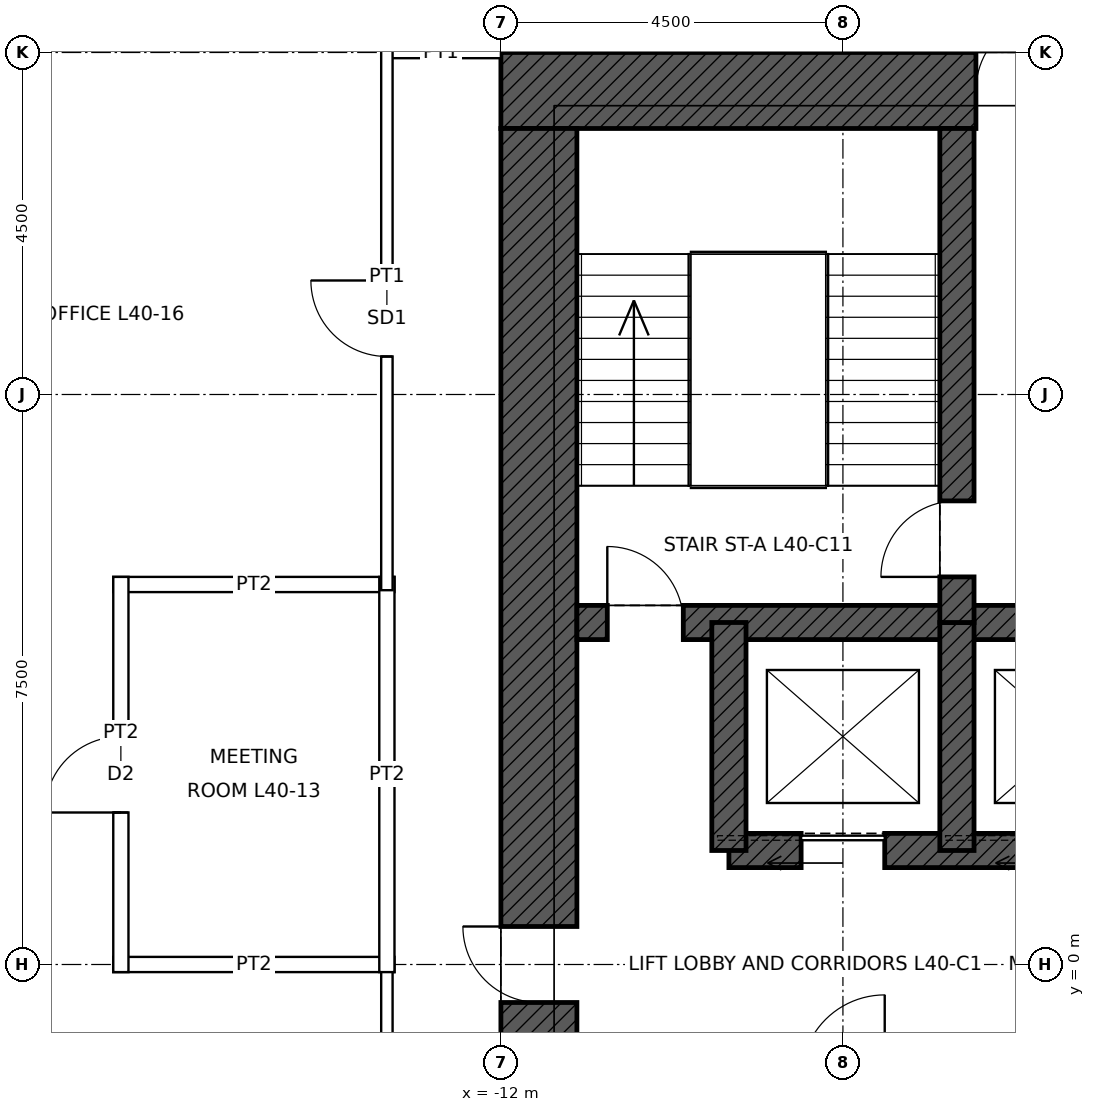
"""IFC4 building model, lengths in metres.
Left out: names, types, materials, properties, quantities, classifications, styles, units other than length and angle.
Written with IfcOpenShell. Run it as: python <this file> out.ifc"""

import sys

from ifc_helpers import new_model, si_unit, direction, frame, frame_2d, origin, place, context, subcontext, project, spatial, rectangle, extrude, element, fill, save


model = new_model("IFC4")
c1 = context("Model", 3, precision=1e-05, world=origin(), true_north=direction((0.0, 1.0)))
c2 = subcontext(c1, "Body", "Model", "MODEL_VIEW")
j1 = project(units=[si_unit("LENGTHUNIT", "METRE"), si_unit("PLANEANGLEUNIT", "RADIAN")], contexts=[c1])
p1 = place(None, origin())
s1 = spatial("IfcSite", under=j1, at=p1, CompositionType="ELEMENT")
p2 = place(p1, origin())
s2 = spatial("IfcBuilding", under=s1, at=p2, CompositionType="ELEMENT")
p3 = place(p2, frame((0.0, 0.0, 193.9)))
s3 = spatial("IfcBuildingStorey", under=s2, at=p3, CompositionType="ELEMENT", Elevation=193.9)
p4 = place(p3, frame((-12.0, 11.5, 0.0), z_axis=(0.0, 0.0, 1.0), x_axis=(1.0, 0.0, 0.0)))
e1 = element("IfcWall", 1, at=p4, inside=s3, PredefinedType="SHEAR", context=c2, shape_type="SweptSolid", body=[
    extrude(rectangle(XDim=24.0, YDim=1.0, at=frame_2d((12.0, 0.0))), origin(), (0.0, 0.0, 1.0), 4.0),
])
p5 = place(p4, frame((6.25, 0.0, 0.0)))
e2 = element("IfcOpeningElement", 2, at=p5, cuts=e1, PredefinedType="OPENING", context=c2, shape_type="SweptSolid", body=[
    extrude(rectangle(XDim=1.0, YDim=2.4, at=frame_2d((0.5, 1.2))), frame((0.0, 0.51, 0.0), z_axis=(0.0, -1.0, 0.0), x_axis=(1.0, 0.0, 0.0)), (0.0, 0.0, 1.0), 1.02),
])
p6 = place(p4, frame((16.75, 0.0, 0.0)))
e3 = element("IfcOpeningElement", 3, at=p6, cuts=e1, PredefinedType="OPENING", context=c2, shape_type="SweptSolid", body=[
    extrude(rectangle(XDim=1.0, YDim=2.4, at=frame_2d((0.5, 1.2))), frame((0.0, 0.51, 0.0), z_axis=(0.0, -1.0, 0.0), x_axis=(1.0, 0.0, 0.0)), (0.0, 0.0, 1.0), 1.02),
])
p7 = place(p3, frame((-11.5, -11.0, 0.0), z_axis=(0.0, 0.0, 1.0), x_axis=(0.0, 1.0, 0.0)))
e4 = element("IfcWall", 4, at=p7, inside=s3, PredefinedType="SHEAR", context=c2, shape_type="SweptSolid", body=[
    extrude(rectangle(XDim=22.0, YDim=1.0, at=frame_2d((11.0, 0.0))), origin(), (0.0, 0.0, 1.0), 4.0),
])
p8 = place(p7, frame((10.5, 0.0, 0.0)))
e5 = element("IfcOpeningElement", 5, at=p8, cuts=e4, PredefinedType="OPENING", context=c2, shape_type="SweptSolid", body=[
    extrude(rectangle(XDim=1.0, YDim=2.4, at=frame_2d((0.5, 1.2))), frame((0.0, 0.51, 0.0), z_axis=(0.0, -1.0, 0.0), x_axis=(1.0, 0.0, 0.0)), (0.0, 0.0, 1.0), 1.02),
])
p9 = place(p3, frame((-11.0, 4.5, 0.0), z_axis=(0.0, 0.0, 1.0), x_axis=(1.0, 0.0, 0.0)))
e6 = element("IfcWall", 6, at=p9, inside=s3, PredefinedType="SHEAR", context=c2, shape_type="SweptSolid", body=[
    extrude(rectangle(XDim=22.0, YDim=0.45, at=frame_2d((11.0, 0.0))), origin(), (0.0, 0.0, 1.0), 4.0),
])
p10 = place(p9, frame((0.4, 0.0, 0.0)))
e7 = element("IfcOpeningElement", 7, at=p10, cuts=e6, PredefinedType="OPENING", context=c2, shape_type="SweptSolid", body=[
    extrude(rectangle(XDim=1.0, YDim=2.1, at=frame_2d((0.5, 1.05))), frame((0.0, 0.235, 0.0), z_axis=(0.0, -1.0, 0.0), x_axis=(1.0, 0.0, 0.0)), (0.0, 0.0, 1.0), 0.47),
])
p11 = place(p9, frame((20.6, 0.0, 0.0)))
e8 = element("IfcOpeningElement", 8, at=p11, cuts=e6, PredefinedType="OPENING", context=c2, shape_type="SweptSolid", body=[
    extrude(rectangle(XDim=1.0, YDim=2.1, at=frame_2d((0.5, 1.05))), frame((0.0, 0.235, 0.0), z_axis=(0.0, -1.0, 0.0), x_axis=(1.0, 0.0, 0.0)), (0.0, 0.0, 1.0), 0.47),
])
p12 = place(p3, frame((-9.0, 1.5, 0.0), z_axis=(0.0, 0.0, 1.0), x_axis=(1.0, 0.0, 0.0)))
e9 = element("IfcWall", 9, at=p12, inside=s3, PredefinedType="SHEAR", context=c2, shape_type="SweptSolid", body=[
    extrude(rectangle(XDim=18.0, YDim=0.45, at=frame_2d((9.0, 0.0))), origin(), (0.0, 0.0, 1.0), 4.0),
])
p13 = place(p12, frame((0.95, 0.0, 0.0)))
e10 = element("IfcOpeningElement", 10, at=p13, cuts=e9, PredefinedType="OPENING", context=c2, shape_type="SweptSolid", body=[
    extrude(rectangle(XDim=1.1, YDim=2.1, at=frame_2d((0.55, 1.05))), frame((0.0, 0.235, 0.0), z_axis=(0.0, -1.0, 0.0), x_axis=(1.0, 0.0, 0.0)), (0.0, 0.0, 1.0), 0.47),
])
p14 = place(p12, frame((3.95, 0.0, 0.0)))
e11 = element("IfcOpeningElement", 11, at=p14, cuts=e9, PredefinedType="OPENING", context=c2, shape_type="SweptSolid", body=[
    extrude(rectangle(XDim=1.1, YDim=2.1, at=frame_2d((0.55, 1.05))), frame((0.0, 0.235, 0.0), z_axis=(0.0, -1.0, 0.0), x_axis=(1.0, 0.0, 0.0)), (0.0, 0.0, 1.0), 0.47),
])
p15 = place(p12, frame((6.95, 0.0, 0.0)))
e12 = element("IfcOpeningElement", 12, at=p15, cuts=e9, PredefinedType="OPENING", context=c2, shape_type="SweptSolid", body=[
    extrude(rectangle(XDim=1.1, YDim=2.1, at=frame_2d((0.55, 1.05))), frame((0.0, 0.235, 0.0), z_axis=(0.0, -1.0, 0.0), x_axis=(1.0, 0.0, 0.0)), (0.0, 0.0, 1.0), 0.47),
])
p16 = place(p12, frame((9.95, 0.0, 0.0)))
e13 = element("IfcOpeningElement", 13, at=p16, cuts=e9, PredefinedType="OPENING", context=c2, shape_type="SweptSolid", body=[
    extrude(rectangle(XDim=1.1, YDim=2.1, at=frame_2d((0.55, 1.05))), frame((0.0, 0.235, 0.0), z_axis=(0.0, -1.0, 0.0), x_axis=(1.0, 0.0, 0.0)), (0.0, 0.0, 1.0), 0.47),
])
p17 = place(p12, frame((12.95, 0.0, 0.0)))
e14 = element("IfcOpeningElement", 14, at=p17, cuts=e9, PredefinedType="OPENING", context=c2, shape_type="SweptSolid", body=[
    extrude(rectangle(XDim=1.1, YDim=2.1, at=frame_2d((0.55, 1.05))), frame((0.0, 0.235, 0.0), z_axis=(0.0, -1.0, 0.0), x_axis=(1.0, 0.0, 0.0)), (0.0, 0.0, 1.0), 0.47),
])
p18 = place(p12, frame((15.95, 0.0, 0.0)))
e15 = element("IfcOpeningElement", 15, at=p18, cuts=e9, PredefinedType="OPENING", context=c2, shape_type="SweptSolid", body=[
    extrude(rectangle(XDim=1.1, YDim=2.1, at=frame_2d((0.55, 1.05))), frame((0.0, 0.235, 0.0), z_axis=(0.0, -1.0, 0.0), x_axis=(1.0, 0.0, 0.0)), (0.0, 0.0, 1.0), 0.47),
])
for number, where, z_axis, x_axis in (
    (16, (-9.0, 1.5, 0.0), (0.0, 0.0, 1.0), (0.0, 1.0, 0.0)),
    (17, (-6.0, 1.5, 0.0), (0.0, 0.0, 1.0), (0.0, 1.0, 0.0)),
):
    element("IfcWall", number, at=place(p3, frame(where, z_axis=z_axis, x_axis=x_axis)), inside=s3, PredefinedType="SHEAR", context=c2, shape_type="SweptSolid", body=[
        extrude(rectangle(XDim=3.0, YDim=0.45, at=frame_2d((1.5, 0.0))), origin(), (0.0, 0.0, 1.0), 4.0),
    ])
p19 = place(p3, frame((-6.0, 4.5, 0.0), z_axis=(0.0, 0.0, 1.0), x_axis=(0.0, 1.0, 0.0)))
e18 = element("IfcWall", 18, at=p19, inside=s3, PredefinedType="SHEAR", context=c2, shape_type="SweptSolid", body=[
    extrude(rectangle(XDim=6.5, YDim=0.45, at=frame_2d((3.25, 0.0))), origin(), (0.0, 0.0, 1.0), 4.0),
])
p20 = place(p19, frame((0.6, 0.0, 0.0)))
e19 = element("IfcOpeningElement", 19, at=p20, cuts=e18, PredefinedType="OPENING", context=c2, shape_type="SweptSolid", body=[
    extrude(rectangle(XDim=1.0, YDim=2.1, at=frame_2d((0.5, 1.05))), frame((0.0, 0.235, 0.0), z_axis=(0.0, -1.0, 0.0), x_axis=(1.0, 0.0, 0.0)), (0.0, 0.0, 1.0), 0.47),
])
p21 = place(p3, frame((-17.1, 0.0, 0.0), z_axis=(0.0, 0.0, 1.0), x_axis=(1.0, 0.0, 0.0)))
e20 = element("IfcWall", 20, at=p21, inside=s3, PredefinedType="PARTITIONING", context=c2, shape_type="SweptSolid", body=[
    extrude(rectangle(XDim=3.7, YDim=0.2, at=frame_2d((1.85, 0.0))), origin(), (0.0, 0.0, 1.0), 3.238),
])
p22 = place(p3, frame((-17.1, 5.0, 0.0), z_axis=(0.0, 0.0, 1.0), x_axis=(1.0, 0.0, 0.0)))
e21 = element("IfcWall", 21, at=p22, inside=s3, PredefinedType="PARTITIONING", context=c2, shape_type="SweptSolid", body=[
    extrude(rectangle(XDim=3.7, YDim=0.2, at=frame_2d((1.85, 0.0))), origin(), (0.0, 0.0, 1.0), 3.85),
])
p23 = place(p3, frame((-13.575, 12.0, 0.0), z_axis=(0.0, 0.0, 1.0), x_axis=(1.0, 0.0, 0.0)))
e22 = element("IfcWall", 22, at=p23, inside=s3, PredefinedType="PARTITIONING", context=c2, shape_type="SweptSolid", body=[
    extrude(rectangle(XDim=1.575, YDim=0.15, at=frame_2d((0.788, 0.0))), origin(), (0.0, 0.0, 1.0), 3.85),
])
p24 = place(p3, frame((-17.0, -0.1, 0.0), z_axis=(0.0, 0.0, 1.0), x_axis=(0.0, 1.0, 0.0)))
e23 = element("IfcWall", 23, at=p24, inside=s3, PredefinedType="PARTITIONING", context=c2, shape_type="SweptSolid", body=[
    extrude(rectangle(XDim=5.2, YDim=0.2, at=frame_2d((2.6, 0.0))), origin(), (0.0, 0.0, 1.0), 3.85),
])
p25 = place(p24, frame((2.1, 0.0, 0.0)))
e24 = element("IfcOpeningElement", 24, at=p25, cuts=e23, PredefinedType="OPENING", context=c2, shape_type="SweptSolid", body=[
    extrude(rectangle(XDim=1.0, YDim=2.1, at=frame_2d((0.5, 1.05))), frame((0.0, 0.11, 0.0), z_axis=(0.0, -1.0, 0.0), x_axis=(1.0, 0.0, 0.0)), (0.0, 0.0, 1.0), 0.22),
])
p26 = place(p3, frame((-13.5, -13.575, 0.0), z_axis=(0.0, 0.0, 1.0), x_axis=(0.0, 1.0, 0.0)))
e25 = element("IfcWall", 25, at=p26, inside=s3, PredefinedType="PARTITIONING", context=c2, shape_type="SweptSolid", body=[
    extrude(rectangle(XDim=13.65, YDim=0.15, at=frame_2d((6.825, 0.0))), origin(), (0.0, 0.0, 1.0), 3.85),
])
p27 = place(p3, frame((-13.5, -0.1, 0.0), z_axis=(0.0, 0.0, 1.0), x_axis=(0.0, 1.0, 0.0)))
e26 = element("IfcWall", 26, at=p27, inside=s3, PredefinedType="PARTITIONING", context=c2, shape_type="SweptSolid", body=[
    extrude(rectangle(XDim=5.2, YDim=0.2, at=frame_2d((2.6, 0.0))), origin(), (0.0, 0.0, 1.0), 3.85),
])
p28 = place(p3, frame((-13.5, 4.925, 0.0), z_axis=(0.0, 0.0, 1.0), x_axis=(0.0, 1.0, 0.0)))
e27 = element("IfcWall", 27, at=p28, inside=s3, PredefinedType="PARTITIONING", context=c2, shape_type="SweptSolid", body=[
    extrude(rectangle(XDim=7.15, YDim=0.15, at=frame_2d((3.575, 0.0))), origin(), (0.0, 0.0, 1.0), 3.85),
])
p29 = place(p28, frame((3.075, 0.0, 0.0)))
e28 = element("IfcOpeningElement", 28, at=p29, cuts=e27, PredefinedType="OPENING", context=c2, shape_type="SweptSolid", body=[
    extrude(rectangle(XDim=1.0, YDim=2.4, at=frame_2d((0.5, 1.2))), frame((0.0, 0.085, 0.0), z_axis=(0.0, -1.0, 0.0), x_axis=(1.0, 0.0, 0.0)), (0.0, 0.0, 1.0), 0.17),
])
p30 = place(p10, origin())
e29 = element("IfcDoor", 29, at=p30, inside=s3, OperationType="SINGLE_SWING_LEFT", PredefinedType="DOOR", context=c2, shape_type="SweptSolid", body=[
    extrude(rectangle(XDim=1.0, YDim=2.1, at=frame_2d((0.5, 1.05))), frame((0.0, 0.025, 0.0), z_axis=(0.0, -1.0, 0.0), x_axis=(1.0, 0.0, 0.0)), (0.0, 0.0, 1.0), 0.05),
])
fill(e7, e29)
p31 = place(p20, origin())
e30 = element("IfcDoor", 30, at=p31, inside=s3, OperationType="SINGLE_SWING_LEFT", PredefinedType="DOOR", context=c2, shape_type="SweptSolid", body=[
    extrude(rectangle(XDim=1.0, YDim=2.1, at=frame_2d((0.5, 1.05))), frame((0.0, 0.025, 0.0), z_axis=(0.0, -1.0, 0.0), x_axis=(1.0, 0.0, 0.0)), (0.0, 0.0, 1.0), 0.05),
])
fill(e19, e30)
p32 = place(p5, origin())
e31 = element("IfcDoor", 31, at=p32, inside=s3, OperationType="SINGLE_SWING_RIGHT", PredefinedType="DOOR", context=c2, shape_type="SweptSolid", body=[
    extrude(rectangle(XDim=1.0, YDim=2.4, at=frame_2d((0.5, 1.2))), frame((0.0, 0.485, 0.0), z_axis=(0.0, -1.0, 0.0), x_axis=(1.0, 0.0, 0.0)), (0.0, 0.0, 1.0), 0.05),
])
fill(e2, e31)
p33 = place(p8, origin())
e32 = element("IfcDoor", 32, at=p33, inside=s3, OperationType="SINGLE_SWING_RIGHT", PredefinedType="DOOR", context=c2, shape_type="SweptSolid", body=[
    extrude(rectangle(XDim=1.0, YDim=2.4, at=frame_2d((0.5, 1.2))), frame((0.0, 0.485, 0.0), z_axis=(0.0, -1.0, 0.0), x_axis=(1.0, 0.0, 0.0)), (0.0, 0.0, 1.0), 0.05),
])
fill(e5, e32)
p34 = place(p13, origin())
e33 = element("IfcDoor", 33, at=p34, inside=s3, OperationType="SLIDING_TO_LEFT", PredefinedType="DOOR", context=c2, shape_type="SweptSolid", body=[
    extrude(rectangle(XDim=1.1, YDim=2.1, at=frame_2d((0.55, 1.05))), frame((0.0, 0.025, 0.0), z_axis=(0.0, -1.0, 0.0), x_axis=(1.0, 0.0, 0.0)), (0.0, 0.0, 1.0), 0.05),
])
fill(e10, e33)
p35 = place(p25, origin())
e34 = element("IfcDoor", 34, at=p35, inside=s3, OperationType="SINGLE_SWING_LEFT", PredefinedType="DOOR", context=c2, shape_type="SweptSolid", body=[
    extrude(rectangle(XDim=1.0, YDim=2.1, at=frame_2d((0.5, 1.05))), frame((0.0, 0.025, 0.0), z_axis=(0.0, -1.0, 0.0), x_axis=(1.0, 0.0, 0.0)), (0.0, 0.0, 1.0), 0.05),
])
fill(e24, e34)
p36 = place(p29, origin())
e35 = element("IfcDoor", 35, at=p36, inside=s3, OperationType="SINGLE_SWING_RIGHT", PredefinedType="DOOR", context=c2, shape_type="SweptSolid", body=[
    extrude(rectangle(XDim=1.0, YDim=2.4, at=frame_2d((0.5, 1.2))), frame((0.0, 0.025, 0.0), z_axis=(0.0, -1.0, 0.0), x_axis=(1.0, 0.0, 0.0)), (0.0, 0.0, 1.0), 0.05),
])
fill(e28, e35)
save(model, sys.argv[1])
